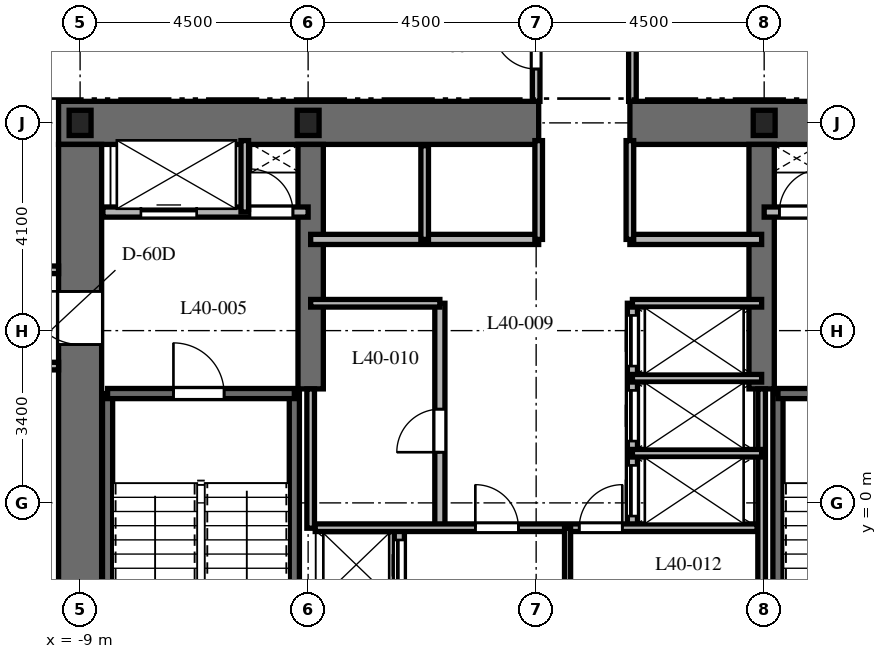
"""IFC4 building model, lengths in metres.
Left out: names, types, materials, properties, quantities, classifications, styles, units other than length and angle.
Written with IfcOpenShell. Run it as: python <this file> out.ifc"""

import sys

from ifc_helpers import new_model, si_unit, direction, frame, frame_2d, origin, origin_2d, place, context, subcontext, project, spatial, rectangle, i_section, extrude, element, fill, save


model = new_model("IFC4")
c1 = context("Model", 3, precision=1e-05, world=origin(), true_north=direction((0.0, 1.0)))
c2 = subcontext(c1, "Body", "Model", "MODEL_VIEW")
j1 = project(units=[si_unit("LENGTHUNIT", "METRE"), si_unit("PLANEANGLEUNIT", "RADIAN")], contexts=[c1])
p1 = place(None, origin())
s1 = spatial("IfcSite", under=j1, at=p1, CompositionType="ELEMENT")
p2 = place(p1, origin())
s2 = spatial("IfcBuilding", under=s1, at=p2, CompositionType="ELEMENT")
p3 = place(p2, frame((0.0, 0.0, 162.8)))
s3 = spatial("IfcBuildingStorey", under=s2, at=p3, CompositionType="ELEMENT", Elevation=162.8)
p4 = place(p3, frame((-9.425, 7.5, 0.0), z_axis=(0.0, 0.0, 1.0), x_axis=(1.0, 0.0, 0.0)))
e1 = element("IfcWall", 1, at=p4, inside=s3, PredefinedType="SHEAR", context=c2, shape_type="SweptSolid", body=[
    extrude(rectangle(XDim=9.475, YDim=0.85, at=frame_2d((4.738, 0.0))), origin(), (0.0, 0.0, 1.0), 3.7),
])
p5 = place(p3, frame((1.85, 7.5, 0.0), z_axis=(0.0, 0.0, 1.0), x_axis=(1.0, 0.0, 0.0)))
e2 = element("IfcWall", 2, at=p5, inside=s3, PredefinedType="SHEAR", context=c2, shape_type="SweptSolid", body=[
    extrude(rectangle(XDim=7.575, YDim=0.85, at=frame_2d((3.788, 0.0))), origin(), (0.0, 0.0, 1.0), 3.7),
])
p6 = place(p3, frame((-9.0, -7.075, 0.0), z_axis=(0.0, 0.0, 1.0), x_axis=(0.0, 1.0, 0.0)))
e3 = element("IfcWall", 3, at=p6, inside=s3, PredefinedType="SHEAR", context=c2, shape_type="SweptSolid", body=[
    extrude(rectangle(XDim=14.15, YDim=0.85, at=frame_2d((7.075, 0.0))), origin(), (0.0, 0.0, 1.0), 3.7),
])
p7 = place(p6, frame((10.2, 0.0, 0.0)))
e4 = element("IfcOpeningElement", 4, at=p7, cuts=e3, PredefinedType="OPENING", context=c2, shape_type="SweptSolid", body=[
    extrude(rectangle(XDim=1.05, YDim=2.15, at=frame_2d((0.525, 1.075))), frame((0.0, 0.435, 0.0), z_axis=(0.0, -1.0, 0.0), x_axis=(1.0, 0.0, 0.0)), (0.0, 0.0, 1.0), 0.87),
])
for number, where, z_axis, x_axis in (
    (5, (-4.45, 2.25, 0.0), (0.0, 0.0, 1.0), (0.0, 1.0, 0.0)),
    (6, (4.45, 2.25, 0.0), (0.0, 0.0, 1.0), (0.0, 1.0, 0.0)),
):
    element("IfcWall", number, at=place(p3, frame(where, z_axis=z_axis, x_axis=x_axis)), inside=s3, PredefinedType="SHEAR", context=c2, shape_type="SweptSolid", body=[
        extrude(rectangle(XDim=4.825, YDim=0.5, at=frame_2d((2.413, 0.0))), origin(), (0.0, 0.0, 1.0), 3.7),
    ])
for number, where, z_axis, x_axis in (
    (7, (-8.458, -6.985, 0.0), (0.0, 0.0, 1.0), (0.0, 1.0, 0.0)),
    (8, (-4.772, -6.985, 0.0), (0.0, 0.0, 1.0), (0.0, 1.0, 0.0)),
):
    element("IfcWall", number, at=place(p3, frame(where, z_axis=z_axis, x_axis=x_axis)), inside=s3, PredefinedType="SHEAR", context=c2, shape_type="SweptSolid", body=[
        extrude(rectangle(XDim=9.143, YDim=0.2, at=frame_2d((4.572, 0.0))), origin(), (0.0, 0.0, 1.0), 3.7),
    ])
p8 = place(p3, frame((-8.458, 2.158, 0.0), z_axis=(0.0, 0.0, 1.0), x_axis=(1.0, 0.0, 0.0)))
e9 = element("IfcWall", 9, at=p8, inside=s3, PredefinedType="SHEAR", context=c2, shape_type="SweptSolid", body=[
    extrude(rectangle(XDim=3.686, YDim=0.2, at=frame_2d((1.843, 0.0))), origin(), (0.0, 0.0, 1.0), 3.7),
])
p9 = place(p8, frame((1.3, 0.0, 0.0)))
e10 = element("IfcOpeningElement", 10, at=p9, cuts=e9, PredefinedType="OPENING", context=c2, shape_type="SweptSolid", body=[
    extrude(rectangle(XDim=1.0, YDim=2.15, at=frame_2d((0.5, 1.075))), frame((0.0, 0.11, 0.0), z_axis=(0.0, -1.0, 0.0), x_axis=(1.0, 0.0, 0.0)), (0.0, 0.0, 1.0), 0.22),
])
p10 = place(p3, frame((4.772, -6.985, 0.0), z_axis=(0.0, 0.0, 1.0), x_axis=(0.0, 1.0, 0.0)))
e11 = element("IfcWall", 11, at=p10, inside=s3, PredefinedType="SHEAR", context=c2, shape_type="SweptSolid", body=[
    extrude(rectangle(XDim=9.143, YDim=0.2, at=frame_2d((4.572, 0.0))), origin(), (0.0, 0.0, 1.0), 3.7),
])
p11 = place(p3, frame((4.772, 2.158, 0.0), z_axis=(0.0, 0.0, 1.0), x_axis=(1.0, 0.0, 0.0)))
e12 = element("IfcWall", 12, at=p11, inside=s3, PredefinedType="SHEAR", context=c2, shape_type="SweptSolid", body=[
    extrude(rectangle(XDim=3.686, YDim=0.2, at=frame_2d((1.843, 0.0))), origin(), (0.0, 0.0, 1.0), 3.7),
])
p12 = place(p11, frame((1.35, 0.0, 0.0)))
e13 = element("IfcOpeningElement", 13, at=p12, cuts=e12, PredefinedType="OPENING", context=c2, shape_type="SweptSolid", body=[
    extrude(rectangle(XDim=1.0, YDim=2.15, at=frame_2d((0.5, 1.075))), frame((0.0, 0.11, 0.0), z_axis=(0.0, -1.0, 0.0), x_axis=(1.0, 0.0, 0.0)), (0.0, 0.0, 1.0), 0.22),
])
for number, where, z_axis, x_axis in (
    (14, (4.5, 7.5, 0.0), (0.0, 0.0, 1.0), (1.0, 0.0, 0.0)),
    (15, (-4.5, 7.5, 0.0), (0.0, 0.0, 1.0), (1.0, 0.0, 0.0)),
    (16, (-9.0, 7.5, 0.0), (0.0, 0.0, 1.0), (1.0, 0.0, 0.0)),
):
    element("IfcColumn", number, at=place(p3, frame(where, z_axis=z_axis, x_axis=x_axis)), inside=s3, PredefinedType="COLUMN", context=c2, shape_type="SweptSolid", body=[
        extrude(i_section(OverallWidth=0.432, OverallDepth=0.498, WebThickness=0.056, FlangeThickness=0.089, at=origin_2d()), origin(), (0.0, 0.0, 1.0), 3.7),
    ])
p13 = place(p3, frame((-8.55, 5.74, 0.0), z_axis=(0.0, 0.0, 1.0), x_axis=(1.0, 0.0, 0.0)))
e17 = element("IfcWall", 17, at=p13, inside=s3, PredefinedType="PARTITIONING", context=c2, shape_type="SweptSolid", body=[
    extrude(rectangle(XDim=4.05, YDim=0.2, at=frame_2d((2.025, 0.0))), origin(), (0.0, 0.0, 1.0), 3.4),
])
p14 = place(p13, frame((0.75, 0.0, 0.0)))
e18 = element("IfcOpeningElement", 18, at=p14, cuts=e17, PredefinedType="OPENING", context=c2, shape_type="SweptSolid", body=[
    extrude(rectangle(XDim=1.1, YDim=2.2, at=frame_2d((0.55, 1.1))), frame((0.0, 0.11, 0.0), z_axis=(0.0, -1.0, 0.0), x_axis=(1.0, 0.0, 0.0)), (0.0, 0.0, 1.0), 0.22),
])
p15 = place(p13, frame((2.9, 0.0, 0.0)))
e19 = element("IfcOpeningElement", 19, at=p15, cuts=e17, PredefinedType="OPENING", context=c2, shape_type="SweptSolid", body=[
    extrude(rectangle(XDim=0.85, YDim=2.03, at=frame_2d((0.425, 1.015))), frame((0.0, 0.11, 0.0), z_axis=(0.0, -1.0, 0.0), x_axis=(1.0, 0.0, 0.0)), (0.0, 0.0, 1.0), 0.22),
])
p16 = place(p3, frame((-5.75, 5.74, 0.0), z_axis=(0.0, 0.0, 1.0), x_axis=(0.0, 1.0, 0.0)))
e20 = element("IfcWall", 20, at=p16, inside=s3, PredefinedType="PARTITIONING", context=c2, shape_type="SweptSolid", body=[
    extrude(rectangle(XDim=1.41, YDim=0.15, at=frame_2d((0.705, 0.0))), origin(), (0.0, 0.0, 1.0), 3.4),
])
p17 = place(p3, frame((4.5, 5.74, 0.0), z_axis=(0.0, 0.0, 1.0), x_axis=(1.0, 0.0, 0.0)))
e21 = element("IfcWall", 21, at=p17, inside=s3, PredefinedType="PARTITIONING", context=c2, shape_type="SweptSolid", body=[
    extrude(rectangle(XDim=4.05, YDim=0.2, at=frame_2d((2.025, 0.0))), origin(), (0.0, 0.0, 1.0), 3.4),
])
p18 = place(p17, frame((0.3, 0.0, 0.0)))
e22 = element("IfcOpeningElement", 22, at=p18, cuts=e21, PredefinedType="OPENING", context=c2, shape_type="SweptSolid", body=[
    extrude(rectangle(XDim=0.85, YDim=2.03, at=frame_2d((0.425, 1.015))), frame((0.0, 0.11, 0.0), z_axis=(0.0, -1.0, 0.0), x_axis=(1.0, 0.0, 0.0)), (0.0, 0.0, 1.0), 0.22),
])
p19 = place(p17, frame((2.15, 0.0, 0.0)))
e23 = element("IfcOpeningElement", 23, at=p19, cuts=e21, PredefinedType="OPENING", context=c2, shape_type="SweptSolid", body=[
    extrude(rectangle(XDim=1.1, YDim=2.2, at=frame_2d((0.55, 1.1))), frame((0.0, 0.11, 0.0), z_axis=(0.0, -1.0, 0.0), x_axis=(1.0, 0.0, 0.0)), (0.0, 0.0, 1.0), 0.22),
])
p20 = place(p3, frame((-2.7, -1.972, 0.0), z_axis=(0.0, 0.0, 1.0), x_axis=(0.0, 1.0, 0.0)))
e24 = element("IfcWall", 24, at=p20, inside=s3, PredefinedType="PARTITIONING", context=c2, shape_type="SweptSolid", body=[
    extrude(rectangle(XDim=1.472, YDim=0.2, at=frame_2d((0.736, 0.0))), origin(), (0.0, 0.0, 1.0), 3.4),
])
p21 = place(p20, frame((0.24, 0.0, 0.0)))
e25 = element("IfcOpeningElement", 25, at=p21, cuts=e24, PredefinedType="OPENING", context=c2, shape_type="SweptSolid", body=[
    extrude(rectangle(XDim=1.0, YDim=2.2, at=frame_2d((0.5, 1.1))), frame((0.0, 0.11, 0.0), z_axis=(0.0, -1.0, 0.0), x_axis=(1.0, 0.0, 0.0)), (0.0, 0.0, 1.0), 0.22),
])
p22 = place(p3, frame((-4.45, 5.2, 0.0), z_axis=(0.0, 0.0, 1.0), x_axis=(1.0, 0.0, 0.0)))
e26 = element("IfcWall", 26, at=p22, inside=s3, PredefinedType="PARTITIONING", context=c2, shape_type="SweptSolid", body=[
    extrude(rectangle(XDim=4.5, YDim=0.2, at=frame_2d((2.25, 0.0))), origin(), (0.0, 0.0, 1.0), 3.4),
])
p23 = place(p3, frame((1.85, 5.2, 0.0), z_axis=(0.0, 0.0, 1.0), x_axis=(1.0, 0.0, 0.0)))
e27 = element("IfcWall", 27, at=p23, inside=s3, PredefinedType="PARTITIONING", context=c2, shape_type="SweptSolid", body=[
    extrude(rectangle(XDim=2.6, YDim=0.2, at=frame_2d((1.3, 0.0))), origin(), (0.0, 0.0, 1.0), 3.4),
])
p24 = place(p3, frame((-2.2, 5.2, 0.0), z_axis=(0.0, 0.0, 1.0), x_axis=(0.0, 1.0, 0.0)))
e28 = element("IfcWall", 28, at=p24, inside=s3, PredefinedType="PARTITIONING", context=c2, shape_type="SweptSolid", body=[
    extrude(rectangle(XDim=1.85, YDim=0.15, at=frame_2d((0.925, 0.0))), origin(), (0.0, 0.0, 1.0), 3.4),
])
for number, where, z_axis, x_axis in (
    (29, (0.05, 5.2, 0.0), (0.0, 0.0, 1.0), (0.0, 1.0, 0.0)),
    (30, (1.85, 5.2, 0.0), (0.0, 0.0, 1.0), (0.0, 1.0, 0.0)),
):
    element("IfcWall", number, at=place(p3, frame(where, z_axis=z_axis, x_axis=x_axis)), inside=s3, PredefinedType="PARTITIONING", context=c2, shape_type="SweptSolid", body=[
        extrude(rectangle(XDim=1.95, YDim=0.15, at=frame_2d((0.975, 0.0))), origin(), (0.0, 0.0, 1.0), 3.4),
    ])
p25 = place(p3, frame((-4.45, -0.5, 0.0), z_axis=(0.0, 0.0, 1.0), x_axis=(0.0, 1.0, 0.0)))
e31 = element("IfcWall", 31, at=p25, inside=s3, PredefinedType="PARTITIONING", context=c2, shape_type="SweptSolid", body=[
    extrude(rectangle(XDim=2.75, YDim=0.15, at=frame_2d((1.375, 0.0))), origin(), (0.0, 0.0, 1.0), 3.4),
])
p26 = place(p3, frame((4.45, -1.972, 0.0), z_axis=(0.0, 0.0, 1.0), x_axis=(0.0, 1.0, 0.0)))
e32 = element("IfcWall", 32, at=p26, inside=s3, PredefinedType="PARTITIONING", context=c2, shape_type="SweptSolid", body=[
    extrude(rectangle(XDim=4.222, YDim=0.15, at=frame_2d((2.111, 0.0))), origin(), (0.0, 0.0, 1.0), 3.4),
])
p27 = place(p3, frame((-1.9, -0.5, 0.0), z_axis=(0.0, 0.0, 1.0), x_axis=(0.0, 1.0, 0.0)))
e33 = element("IfcWall", 33, at=p27, inside=s3, PredefinedType="PARTITIONING", context=c2, shape_type="SweptSolid", body=[
    extrude(rectangle(XDim=4.44, YDim=0.2, at=frame_2d((2.22, 0.0))), origin(), (0.0, 0.0, 1.0), 3.4),
])
p28 = place(p27, frame((1.5, 0.0, 0.0)))
e34 = element("IfcOpeningElement", 34, at=p28, cuts=e33, PredefinedType="OPENING", context=c2, shape_type="SweptSolid", body=[
    extrude(rectangle(XDim=0.85, YDim=2.03, at=frame_2d((0.425, 1.015))), frame((0.0, 0.11, 0.0), z_axis=(0.0, -1.0, 0.0), x_axis=(1.0, 0.0, 0.0)), (0.0, 0.0, 1.0), 0.22),
])
p29 = place(p3, frame((-4.45, 3.94, 0.0), z_axis=(0.0, 0.0, 1.0), x_axis=(1.0, 0.0, 0.0)))
e35 = element("IfcWall", 35, at=p29, inside=s3, PredefinedType="PARTITIONING", context=c2, shape_type="SweptSolid", body=[
    extrude(rectangle(XDim=2.55, YDim=0.15, at=frame_2d((1.275, 0.0))), origin(), (0.0, 0.0, 1.0), 3.4),
])
p30 = place(p3, frame((1.9, -0.5, 0.0), z_axis=(0.0, 0.0, 1.0), x_axis=(0.0, 1.0, 0.0)))
e36 = element("IfcWall", 36, at=p30, inside=s3, PredefinedType="PARTITIONING", context=c2, shape_type="SweptSolid", body=[
    extrude(rectangle(XDim=4.44, YDim=0.2, at=frame_2d((2.22, 0.0))), origin(), (0.0, 0.0, 1.0), 3.4),
])
p31 = place(p30, frame((0.24, 0.0, 0.0)))
e37 = element("IfcOpeningElement", 37, at=p31, cuts=e36, PredefinedType="OPENING", context=c2, shape_type="SweptSolid", body=[
    extrude(rectangle(XDim=1.0, YDim=2.2, at=frame_2d((0.5, 1.1))), frame((0.0, 0.11, 0.0), z_axis=(0.0, -1.0, 0.0), x_axis=(1.0, 0.0, 0.0)), (0.0, 0.0, 1.0), 0.22),
])
p32 = place(p30, frame((1.72, 0.0, 0.0)))
e38 = element("IfcOpeningElement", 38, at=p32, cuts=e36, PredefinedType="OPENING", context=c2, shape_type="SweptSolid", body=[
    extrude(rectangle(XDim=1.0, YDim=2.2, at=frame_2d((0.5, 1.1))), frame((0.0, 0.11, 0.0), z_axis=(0.0, -1.0, 0.0), x_axis=(1.0, 0.0, 0.0)), (0.0, 0.0, 1.0), 0.22),
])
p33 = place(p30, frame((3.2, 0.0, 0.0)))
e39 = element("IfcOpeningElement", 39, at=p33, cuts=e36, PredefinedType="OPENING", context=c2, shape_type="SweptSolid", body=[
    extrude(rectangle(XDim=1.0, YDim=2.2, at=frame_2d((0.5, 1.1))), frame((0.0, 0.11, 0.0), z_axis=(0.0, -1.0, 0.0), x_axis=(1.0, 0.0, 0.0)), (0.0, 0.0, 1.0), 0.22),
])
for number, where, z_axis, x_axis in (
    (40, (1.9, 3.94, 0.0), (0.0, 0.0, 1.0), (1.0, 0.0, 0.0)),
    (41, (1.9, 0.98, 0.0), (0.0, 0.0, 1.0), (1.0, 0.0, 0.0)),
    (42, (1.9, 2.46, 0.0), (0.0, 0.0, 1.0), (1.0, 0.0, 0.0)),
):
    element("IfcWall", number, at=place(p3, frame(where, z_axis=z_axis, x_axis=x_axis)), inside=s3, PredefinedType="PARTITIONING", context=c2, shape_type="SweptSolid", body=[
        extrude(rectangle(XDim=2.55, YDim=0.15, at=frame_2d((1.275, 0.0))), origin(), (0.0, 0.0, 1.0), 3.4),
    ])
p34 = place(p3, frame((-4.36, -0.49, 0.0), z_axis=(0.0, 0.0, 1.0), x_axis=(1.0, 0.0, 0.0)))
e43 = element("IfcWall", 43, at=p34, inside=s3, PredefinedType="PARTITIONING", context=c2, shape_type="SweptSolid", body=[
    extrude(rectangle(XDim=8.72, YDim=0.15, at=frame_2d((4.36, 0.0))), origin(), (0.0, 0.0, 1.0), 3.4),
])
p35 = place(p34, frame((3.16, 0.0, 0.0)))
e44 = element("IfcOpeningElement", 44, at=p35, cuts=e43, PredefinedType="OPENING", context=c2, shape_type="SweptSolid", body=[
    extrude(rectangle(XDim=0.85, YDim=2.03, at=frame_2d((0.425, 1.015))), frame((0.0, 0.085, 0.0), z_axis=(0.0, -1.0, 0.0), x_axis=(1.0, 0.0, 0.0)), (0.0, 0.0, 1.0), 0.17),
])
p36 = place(p34, frame((5.21, 0.0, 0.0)))
e45 = element("IfcOpeningElement", 45, at=p36, cuts=e43, PredefinedType="OPENING", context=c2, shape_type="SweptSolid", body=[
    extrude(rectangle(XDim=0.85, YDim=2.03, at=frame_2d((0.425, 1.015))), frame((0.0, 0.085, 0.0), z_axis=(0.0, -1.0, 0.0), x_axis=(1.0, 0.0, 0.0)), (0.0, 0.0, 1.0), 0.17),
])
p37 = place(p3, frame((0.62, -1.972, 0.0), z_axis=(0.0, 0.0, 1.0), x_axis=(0.0, 1.0, 0.0)))
e46 = element("IfcWall", 46, at=p37, inside=s3, PredefinedType="PARTITIONING", context=c2, shape_type="SweptSolid", body=[
    extrude(rectangle(XDim=1.472, YDim=0.12, at=frame_2d((0.736, 0.0))), origin(), (0.0, 0.0, 1.0), 3.4),
])
p38 = place(p3, frame((1.9, 10.05, 0.0), z_axis=(0.0, 0.0, 1.0), x_axis=(0.0, -1.0, 0.0)))
e47 = element("IfcWall", 47, at=p38, inside=s3, PredefinedType="PARTITIONING", context=c2, shape_type="SweptSolid", body=[
    extrude(rectangle(XDim=2.125, YDim=0.15, at=frame_2d((1.062, 0.0))), origin(), (0.0, 0.0, 1.0), 3.4),
])
p39 = place(p3, frame((0.0, 7.925, 0.0), z_axis=(0.0, 0.0, 1.0), x_axis=(0.0, 1.0, 0.0)))
e48 = element("IfcWall", 48, at=p39, inside=s3, PredefinedType="PARTITIONING", context=c2, shape_type="SweptSolid", body=[
    extrude(rectangle(XDim=2.125, YDim=0.15, at=frame_2d((1.062, 0.0))), origin(), (0.0, 0.0, 1.0), 3.4),
])
p40 = place(p39, frame((0.638, 0.0, 0.0)))
e49 = element("IfcOpeningElement", 49, at=p40, cuts=e48, PredefinedType="OPENING", context=c2, shape_type="SweptSolid", body=[
    extrude(rectangle(XDim=0.85, YDim=2.03, at=frame_2d((0.425, 1.015))), frame((0.0, 0.085, 0.0), z_axis=(0.0, -1.0, 0.0), x_axis=(1.0, 0.0, 0.0)), (0.0, 0.0, 1.0), 0.17),
])
p41 = place(p3, frame((-11.55, 4.6, 0.0), z_axis=(0.0, 0.0, 1.0), x_axis=(1.0, 0.0, 0.0)))
e50 = element("IfcWall", 50, at=p41, inside=s3, PredefinedType="PARTITIONING", context=c2, shape_type="SweptSolid", body=[
    extrude(rectangle(XDim=2.125, YDim=0.15, at=frame_2d((1.062, 0.0))), origin(), (0.0, 0.0, 1.0), 3.4),
])
p42 = place(p3, frame((-9.425, 2.7, 0.0), z_axis=(0.0, 0.0, 1.0), x_axis=(-1.0, 0.0, 0.0)))
e51 = element("IfcWall", 51, at=p42, inside=s3, PredefinedType="PARTITIONING", context=c2, shape_type="SweptSolid", body=[
    extrude(rectangle(XDim=2.125, YDim=0.15, at=frame_2d((1.062, 0.0))), origin(), (0.0, 0.0, 1.0), 3.4),
])
p43 = place(p42, frame((0.637, 0.0, 0.0)))
e52 = element("IfcOpeningElement", 52, at=p43, cuts=e51, PredefinedType="OPENING", context=c2, shape_type="SweptSolid", body=[
    extrude(rectangle(XDim=0.85, YDim=2.03, at=frame_2d((0.425, 1.015))), frame((0.0, 0.085, 0.0), z_axis=(0.0, -1.0, 0.0), x_axis=(1.0, 0.0, 0.0)), (0.0, 0.0, 1.0), 0.17),
])
p44 = place(p9, origin())
e53 = element("IfcDoor", 53, at=p44, inside=s3, OperationType="SINGLE_SWING_LEFT", PredefinedType="DOOR", context=c2, shape_type="SweptSolid", body=[
    extrude(rectangle(XDim=1.0, YDim=2.15, at=frame_2d((0.5, 1.075))), frame((0.0, 0.025, 0.0), z_axis=(0.0, -1.0, 0.0), x_axis=(1.0, 0.0, 0.0)), (0.0, 0.0, 1.0), 0.05),
])
fill(e10, e53)
p45 = place(p7, origin())
e54 = element("IfcDoor", 54, at=p45, inside=s3, OperationType="SINGLE_SWING_RIGHT", PredefinedType="DOOR", context=c2, shape_type="SweptSolid", body=[
    extrude(rectangle(XDim=1.05, YDim=2.15, at=frame_2d((0.525, 1.075))), frame((0.0, 0.025, 0.0), z_axis=(0.0, -1.0, 0.0), x_axis=(1.0, 0.0, 0.0)), (0.0, 0.0, 1.0), 0.05),
])
fill(e4, e54)
p46 = place(p14, origin())
e55 = element("IfcDoor", 55, at=p46, inside=s3, OperationType="SLIDING_TO_LEFT", PredefinedType="DOOR", context=c2, shape_type="SweptSolid", body=[
    extrude(rectangle(XDim=1.1, YDim=2.2, at=frame_2d((0.55, 1.1))), frame((0.0, 0.025, 0.0), z_axis=(0.0, -1.0, 0.0), x_axis=(1.0, 0.0, 0.0)), (0.0, 0.0, 1.0), 0.05),
])
fill(e18, e55)
p47 = place(p15, origin())
e56 = element("IfcDoor", 56, at=p47, inside=s3, OperationType="SINGLE_SWING_LEFT", PredefinedType="DOOR", context=c2, shape_type="SweptSolid", body=[
    extrude(rectangle(XDim=0.85, YDim=2.03, at=frame_2d((0.425, 1.015))), frame((0.0, 0.025, 0.0), z_axis=(0.0, -1.0, 0.0), x_axis=(1.0, 0.0, 0.0)), (0.0, 0.0, 1.0), 0.05),
])
fill(e19, e56)
p48 = place(p18, origin())
e57 = element("IfcDoor", 57, at=p48, inside=s3, OperationType="SINGLE_SWING_RIGHT", PredefinedType="DOOR", context=c2, shape_type="SweptSolid", body=[
    extrude(rectangle(XDim=0.85, YDim=2.03, at=frame_2d((0.425, 1.015))), frame((0.0, 0.025, 0.0), z_axis=(0.0, -1.0, 0.0), x_axis=(1.0, 0.0, 0.0)), (0.0, 0.0, 1.0), 0.05),
])
fill(e22, e57)
p49 = place(p21, origin())
e58 = element("IfcDoor", 58, at=p49, inside=s3, OperationType="SLIDING_TO_LEFT", PredefinedType="DOOR", context=c2, shape_type="SweptSolid", body=[
    extrude(rectangle(XDim=1.0, YDim=2.2, at=frame_2d((0.5, 1.1))), frame((0.0, 0.025, 0.0), z_axis=(0.0, -1.0, 0.0), x_axis=(1.0, 0.0, 0.0)), (0.0, 0.0, 1.0), 0.05),
])
fill(e25, e58)
p50 = place(p28, origin())
e59 = element("IfcDoor", 59, at=p50, inside=s3, OperationType="SINGLE_SWING_LEFT", PredefinedType="DOOR", context=c2, shape_type="SweptSolid", body=[
    extrude(rectangle(XDim=0.85, YDim=2.03, at=frame_2d((0.425, 1.015))), frame((0.0, 0.025, 0.0), z_axis=(0.0, -1.0, 0.0), x_axis=(1.0, 0.0, 0.0)), (0.0, 0.0, 1.0), 0.05),
])
fill(e34, e59)
p51 = place(p31, origin())
e60 = element("IfcDoor", 60, at=p51, inside=s3, OperationType="SLIDING_TO_RIGHT", PredefinedType="DOOR", context=c2, shape_type="SweptSolid", body=[
    extrude(rectangle(XDim=1.0, YDim=2.2, at=frame_2d((0.5, 1.1))), frame((0.0, 0.025, 0.0), z_axis=(0.0, -1.0, 0.0), x_axis=(1.0, 0.0, 0.0)), (0.0, 0.0, 1.0), 0.05),
])
fill(e37, e60)
p52 = place(p32, origin())
e61 = element("IfcDoor", 61, at=p52, inside=s3, OperationType="SLIDING_TO_RIGHT", PredefinedType="DOOR", context=c2, shape_type="SweptSolid", body=[
    extrude(rectangle(XDim=1.0, YDim=2.2, at=frame_2d((0.5, 1.1))), frame((0.0, 0.025, 0.0), z_axis=(0.0, -1.0, 0.0), x_axis=(1.0, 0.0, 0.0)), (0.0, 0.0, 1.0), 0.05),
])
fill(e38, e61)
p53 = place(p33, origin())
e62 = element("IfcDoor", 62, at=p53, inside=s3, OperationType="SLIDING_TO_RIGHT", PredefinedType="DOOR", context=c2, shape_type="SweptSolid", body=[
    extrude(rectangle(XDim=1.0, YDim=2.2, at=frame_2d((0.5, 1.1))), frame((0.0, 0.025, 0.0), z_axis=(0.0, -1.0, 0.0), x_axis=(1.0, 0.0, 0.0)), (0.0, 0.0, 1.0), 0.05),
])
fill(e39, e62)
p54 = place(p35, origin())
e63 = element("IfcDoor", 63, at=p54, inside=s3, OperationType="SINGLE_SWING_LEFT", PredefinedType="DOOR", context=c2, shape_type="SweptSolid", body=[
    extrude(rectangle(XDim=0.85, YDim=2.03, at=frame_2d((0.425, 1.015))), frame((0.0, 0.025, 0.0), z_axis=(0.0, -1.0, 0.0), x_axis=(1.0, 0.0, 0.0)), (0.0, 0.0, 1.0), 0.05),
])
fill(e44, e63)
p55 = place(p36, origin())
e64 = element("IfcDoor", 64, at=p55, inside=s3, OperationType="SINGLE_SWING_RIGHT", PredefinedType="DOOR", context=c2, shape_type="SweptSolid", body=[
    extrude(rectangle(XDim=0.85, YDim=2.03, at=frame_2d((0.425, 1.015))), frame((0.0, 0.025, 0.0), z_axis=(0.0, -1.0, 0.0), x_axis=(1.0, 0.0, 0.0)), (0.0, 0.0, 1.0), 0.05),
])
fill(e45, e64)
p56 = place(p40, origin())
e65 = element("IfcDoor", 65, at=p56, inside=s3, OperationType="SINGLE_SWING_RIGHT", PredefinedType="DOOR", context=c2, shape_type="SweptSolid", body=[
    extrude(rectangle(XDim=0.85, YDim=2.03, at=frame_2d((0.425, 1.015))), frame((0.0, 0.025, 0.0), z_axis=(0.0, -1.0, 0.0), x_axis=(1.0, 0.0, 0.0)), (0.0, 0.0, 1.0), 0.05),
])
fill(e49, e65)
save(model, sys.argv[1])
